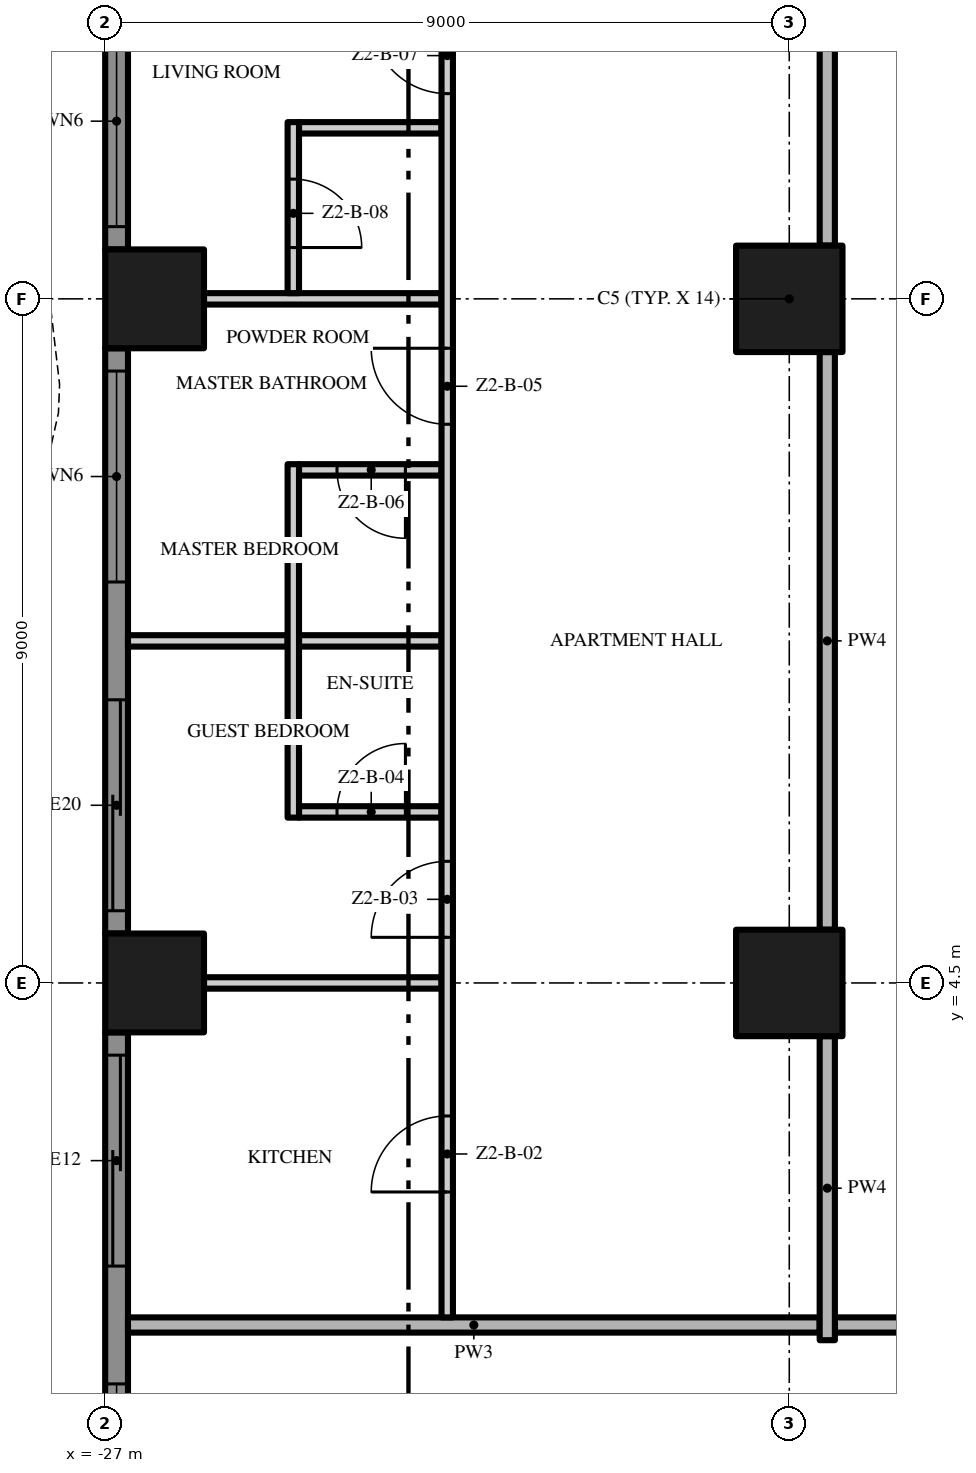
"""IFC4 building model, lengths in metres.
Left out: names, types, materials, properties, quantities, classifications, styles, units other than length and angle.
Written with IfcOpenShell. Run it as: python <this file> out.ifc"""

import sys

from ifc_helpers import new_model, si_unit, direction, frame, frame_2d, origin, origin_2d, place, context, subcontext, project, spatial, polyline, rectangle, outline, extrude, element, fill, save


model = new_model("IFC4")
c1 = context("Model", 3, precision=1e-05, world=origin(), true_north=direction((0.0, 1.0)))
c2 = subcontext(c1, "Body", "Model", "MODEL_VIEW")
j1 = project(units=[si_unit("LENGTHUNIT", "METRE"), si_unit("PLANEANGLEUNIT", "RADIAN")], contexts=[c1])
p1 = place(None, origin())
s1 = spatial("IfcSite", under=j1, at=p1, CompositionType="ELEMENT")
p2 = place(p1, origin())
s2 = spatial("IfcBuilding", under=s1, at=p2, CompositionType="ELEMENT")
p3 = place(p2, frame((0.0, 0.0, 88.4)))
s3 = spatial("IfcBuildingStorey", under=s2, at=p3, CompositionType="ELEMENT", Elevation=88.4)
for number, where, z_axis, x_axis in (
    (1, (-18.0, 13.5, 0.0), (0.0, 0.0, 1.0), (1.0, 0.0, 0.0)),
    (2, (-18.0, 4.5, 0.0), (0.0, 0.0, 1.0), (1.0, 0.0, 0.0)),
):
    element("IfcColumn", number, at=place(p3, frame(where, z_axis=z_axis, x_axis=x_axis)), inside=s3, PredefinedType="COLUMN", context=c2, shape_type="SweptSolid", body=[
        extrude(rectangle(XDim=1.4, YDim=1.4, at=origin_2d()), origin(), (0.0, 0.0, 1.0), 3.5),
    ])
for number, where, z_axis, x_axis in (
    (3, (-26.35, 13.5, 0.0), (0.0, 0.0, 1.0), (1.0, 0.0, 0.0)),
    (4, (-26.35, 4.5, 0.0), (0.0, 0.0, 1.0), (1.0, 0.0, 0.0)),
):
    element("IfcColumn", number, at=place(p3, frame(where, z_axis=z_axis, x_axis=x_axis)), inside=s3, PredefinedType="COLUMN", context=c2, shape_type="SweptSolid", body=[
        extrude(rectangle(XDim=1.3, YDim=1.3, at=origin_2d()), origin(), (0.0, 0.0, 1.0), 3.5),
    ])
p4 = place(p3, frame((-26.85, 14.15, 0.0), z_axis=(0.0, 0.0, 1.0), x_axis=(0.0, 1.0, 0.0)))
e5 = element("IfcWall", 5, at=p4, inside=s3, PredefinedType="SOLIDWALL", context=c2, shape_type="SweptSolid", body=[
    extrude(rectangle(XDim=3.55, YDim=0.3, at=frame_2d((1.775, 0.0))), origin(), (0.0, 0.0, 1.0), 3.5),
])
p5 = place(p4, frame((0.3, 0.0, 0.45)))
e6 = element("IfcOpeningElement", 6, at=p5, cuts=e5, PredefinedType="OPENING", context=c2, shape_type="SweptSolid", body=[
    extrude(rectangle(XDim=2.775, YDim=2.65, at=frame_2d((1.387, 1.325))), frame((0.0, 0.16, 0.0), z_axis=(0.0, -1.0, 0.0), x_axis=(1.0, 0.0, 0.0)), (0.0, 0.0, 1.0), 0.32),
])
p6 = place(p3, frame((-26.85, 5.15, 0.0), z_axis=(0.0, 0.0, 1.0), x_axis=(0.0, 1.0, 0.0)))
e7 = element("IfcWall", 7, at=p6, inside=s3, PredefinedType="SOLIDWALL", context=c2, shape_type="SweptSolid", body=[
    extrude(rectangle(XDim=7.7, YDim=0.3, at=frame_2d((3.85, 0.0))), origin(), (0.0, 0.0, 1.0), 3.5),
])
p7 = place(p6, frame((4.625, 0.0, 0.45)))
e8 = element("IfcOpeningElement", 8, at=p7, cuts=e7, PredefinedType="OPENING", context=c2, shape_type="SweptSolid", body=[
    extrude(rectangle(XDim=2.775, YDim=2.65, at=frame_2d((1.387, 1.325))), frame((0.0, 0.16, 0.0), z_axis=(0.0, -1.0, 0.0), x_axis=(1.0, 0.0, 0.0)), (0.0, 0.0, 1.0), 0.32),
])
p8 = place(p6, frame((0.3, 0.0, 0.0)))
e9 = element("IfcOpeningElement", 9, at=p8, cuts=e7, PredefinedType="OPENING", context=c2, shape_type="SweptSolid", body=[
    extrude(rectangle(XDim=2.775, YDim=2.4, at=frame_2d((1.387, 1.2))), frame((0.0, 0.16, 0.0), z_axis=(0.0, -1.0, 0.0), x_axis=(1.0, 0.0, 0.0)), (0.0, 0.0, 1.0), 0.32),
])
p9 = place(p3, frame((-26.85, -3.85, 0.0), z_axis=(0.0, 0.0, 1.0), x_axis=(0.0, 1.0, 0.0)))
e10 = element("IfcWall", 10, at=p9, inside=s3, PredefinedType="SOLIDWALL", context=c2, shape_type="SweptSolid", body=[
    extrude(rectangle(XDim=7.7, YDim=0.3, at=frame_2d((3.85, 0.0))), origin(), (0.0, 0.0, 1.0), 3.5),
])
p10 = place(p9, frame((4.625, 0.0, 0.0)))
e11 = element("IfcOpeningElement", 11, at=p10, cuts=e10, PredefinedType="OPENING", context=c2, shape_type="SweptSolid", body=[
    extrude(rectangle(XDim=2.775, YDim=2.4, at=frame_2d((1.387, 1.2))), frame((0.0, 0.16, 0.0), z_axis=(0.0, -1.0, 0.0), x_axis=(1.0, 0.0, 0.0)), (0.0, 0.0, 1.0), 0.32),
])
p11 = place(p9, frame((0.3, 0.0, 0.45)))
e12 = element("IfcOpeningElement", 12, at=p11, cuts=e10, PredefinedType="OPENING", context=c2, shape_type="SweptSolid", body=[
    extrude(rectangle(XDim=2.775, YDim=2.65, at=frame_2d((1.387, 1.325))), frame((0.0, 0.16, 0.0), z_axis=(0.0, -1.0, 0.0), x_axis=(1.0, 0.0, 0.0)), (0.0, 0.0, 1.0), 0.32),
])
p12 = place(p3, origin())
e13 = element("IfcWall", 13, at=p12, inside=s3, PredefinedType="USERDEFINED", context=c2, shape_type="SweptSolid", body=[
    extrude(outline(polyline([(-29.649, 18.0), (-28.988, 16.5), (-28.255, 15.0), (-27.731, 13.5), (-27.6, 12.375), (-27.615, 12.0), (-27.951, 10.5), (-28.612, 9.0), (-29.345, 7.5), (-29.869, 6.0), (-30.0, 4.875), (-29.985, 4.5), (-29.649, 3.0), (-28.988, 1.5), (-28.255, 0.0), (-27.731, -1.5), (-27.6, -2.625), (-27.615, -3.0), (-27.951, -4.5), (-28.612, -6.0), (-29.345, -7.5), (-29.869, -9.0), (-30.0, -10.125), (-29.985, -10.5), (-29.649, -12.0), (-28.988, -13.5), (-28.255, -15.0), (-27.731, -16.5), (-27.6, -17.625), (-27.615, -18.0), (-27.365, -18.01), (-27.349, -17.615), (-27.486, -16.444), (-28.024, -14.904), (-28.761, -13.395), (-29.41, -11.921), (-29.736, -10.467), (-29.749, -10.135), (-29.624, -9.056), (-29.114, -7.596), (-28.385, -6.105), (-27.713, -4.579), (-27.366, -3.033), (-27.349, -2.615), (-27.486, -1.444), (-28.024, 0.096), (-28.761, 1.605), (-29.41, 3.079), (-29.736, 4.533), (-29.749, 4.865), (-29.624, 5.944), (-29.114, 7.404), (-28.385, 8.895), (-27.713, 10.421), (-27.366, 11.967), (-27.349, 12.385), (-27.486, 13.556), (-28.024, 15.096), (-28.761, 16.605), (-29.42, 18.101), (-29.649, 18.0)])), origin(), (0.0, 0.0, 1.0), 0.9),
])
p13 = place(p3, frame((-0.1, 0.0, 0.0), z_axis=(0.0, 0.0, 1.0), x_axis=(-1.0, 0.0, 0.0)))
e14 = element("IfcWall", 14, at=p13, inside=s3, PredefinedType="PARTITIONING", context=c2, shape_type="SweptSolid", body=[
    extrude(rectangle(XDim=17.3, YDim=0.2, at=frame_2d((8.65, 0.0))), origin(), (0.0, 0.0, 1.0), 3.5),
])
p14 = place(p13, frame((8.15, 0.0, 0.0)))
e15 = element("IfcOpeningElement", 15, at=p14, cuts=e14, PredefinedType="OPENING", context=c2, shape_type="SweptSolid", body=[
    extrude(rectangle(XDim=1.5, YDim=2.4, at=frame_2d((0.75, 1.2))), frame((0.0, 0.11, 0.0), z_axis=(0.0, -1.0, 0.0), x_axis=(1.0, 0.0, 0.0)), (0.0, 0.0, 1.0), 0.22),
])
p15 = place(p3, frame((-26.7, 0.0, 0.0), z_axis=(0.0, 0.0, 1.0), x_axis=(1.0, 0.0, 0.0)))
e16 = element("IfcWall", 16, at=p15, inside=s3, PredefinedType="PARTITIONING", context=c2, shape_type="SweptSolid", body=[
    extrude(rectangle(XDim=9.1, YDim=0.2, at=frame_2d((4.55, 0.0))), origin(), (0.0, 0.0, 1.0), 3.5),
])
p16 = place(p3, frame((-25.7, 4.5, 0.0), z_axis=(0.0, 0.0, 1.0), x_axis=(1.0, 0.0, 0.0)))
e17 = element("IfcWall", 17, at=p16, inside=s3, PredefinedType="PARTITIONING", context=c2, shape_type="SweptSolid", body=[
    extrude(rectangle(XDim=3.125, YDim=0.15, at=frame_2d((1.562, 0.0))), origin(), (0.0, 0.0, 1.0), 3.5),
])
p17 = place(p3, frame((-24.45, 6.75, 0.0), z_axis=(0.0, 0.0, 1.0), x_axis=(1.0, 0.0, 0.0)))
e18 = element("IfcWall", 18, at=p17, inside=s3, PredefinedType="PARTITIONING", context=c2, shape_type="SweptSolid", body=[
    extrude(rectangle(XDim=1.875, YDim=0.15, at=frame_2d((0.938, 0.0))), origin(), (0.0, 0.0, 1.0), 3.5),
])
p18 = place(p17, frame((0.5, 0.0, 0.0)))
e19 = element("IfcOpeningElement", 19, at=p18, cuts=e18, PredefinedType="OPENING", context=c2, shape_type="SweptSolid", body=[
    extrude(rectangle(XDim=0.9, YDim=2.1, at=frame_2d((0.45, 1.05))), frame((0.0, 0.085, 0.0), z_axis=(0.0, -1.0, 0.0), x_axis=(1.0, 0.0, 0.0)), (0.0, 0.0, 1.0), 0.17),
])
p19 = place(p3, frame((-26.7, 9.0, 0.0), z_axis=(0.0, 0.0, 1.0), x_axis=(1.0, 0.0, 0.0)))
e20 = element("IfcWall", 20, at=p19, inside=s3, PredefinedType="PARTITIONING", context=c2, shape_type="SweptSolid", body=[
    extrude(rectangle(XDim=2.1, YDim=0.15, at=frame_2d((1.05, 0.0))), origin(), (0.0, 0.0, 1.0), 3.5),
])
p20 = place(p3, frame((-24.45, 9.0, 0.0), z_axis=(0.0, 0.0, 1.0), x_axis=(1.0, 0.0, 0.0)))
e21 = element("IfcWall", 21, at=p20, inside=s3, PredefinedType="PARTITIONING", context=c2, shape_type="SweptSolid", body=[
    extrude(rectangle(XDim=1.875, YDim=0.15, at=frame_2d((0.938, 0.0))), origin(), (0.0, 0.0, 1.0), 3.5),
])
p21 = place(p3, frame((-22.575, 11.25, 0.0), z_axis=(0.0, 0.0, 1.0), x_axis=(-1.0, 0.0, 0.0)))
e22 = element("IfcWall", 22, at=p21, inside=s3, PredefinedType="PARTITIONING", context=c2, shape_type="SweptSolid", body=[
    extrude(rectangle(XDim=1.875, YDim=0.15, at=frame_2d((0.938, 0.0))), origin(), (0.0, 0.0, 1.0), 3.5),
])
p22 = place(p21, frame((0.475, 0.0, 0.0)))
e23 = element("IfcOpeningElement", 23, at=p22, cuts=e22, PredefinedType="OPENING", context=c2, shape_type="SweptSolid", body=[
    extrude(rectangle(XDim=0.9, YDim=2.1, at=frame_2d((0.45, 1.05))), frame((0.0, 0.085, 0.0), z_axis=(0.0, -1.0, 0.0), x_axis=(1.0, 0.0, 0.0)), (0.0, 0.0, 1.0), 0.17),
])
p23 = place(p3, frame((-25.7, 13.5, 0.0), z_axis=(0.0, 0.0, 1.0), x_axis=(1.0, 0.0, 0.0)))
e24 = element("IfcWall", 24, at=p23, inside=s3, PredefinedType="PARTITIONING", context=c2, shape_type="SweptSolid", body=[
    extrude(rectangle(XDim=3.125, YDim=0.15, at=frame_2d((1.562, 0.0))), origin(), (0.0, 0.0, 1.0), 3.5),
])
p24 = place(p3, frame((-24.45, 15.75, 0.0), z_axis=(0.0, 0.0, 1.0), x_axis=(1.0, 0.0, 0.0)))
e25 = element("IfcWall", 25, at=p24, inside=s3, PredefinedType="PARTITIONING", context=c2, shape_type="SweptSolid", body=[
    extrude(rectangle(XDim=1.875, YDim=0.15, at=frame_2d((0.938, 0.0))), origin(), (0.0, 0.0, 1.0), 3.5),
])
p25 = place(p3, frame((-24.525, 6.675, 0.0), z_axis=(0.0, 0.0, 1.0), x_axis=(0.0, 1.0, 0.0)))
e26 = element("IfcWall", 26, at=p25, inside=s3, PredefinedType="PARTITIONING", context=c2, shape_type="SweptSolid", body=[
    extrude(rectangle(XDim=4.65, YDim=0.15, at=frame_2d((2.325, 0.0))), origin(), (0.0, 0.0, 1.0), 3.5),
])
p26 = place(p3, frame((-24.525, 15.825, 0.0), z_axis=(0.0, 0.0, 1.0), x_axis=(0.0, -1.0, 0.0)))
e27 = element("IfcWall", 27, at=p26, inside=s3, PredefinedType="PARTITIONING", context=c2, shape_type="SweptSolid", body=[
    extrude(rectangle(XDim=2.25, YDim=0.15, at=frame_2d((1.125, 0.0))), origin(), (0.0, 0.0, 1.0), 3.5),
])
p27 = place(p26, frame((0.75, 0.0, 0.0)))
e28 = element("IfcOpeningElement", 28, at=p27, cuts=e27, PredefinedType="OPENING", context=c2, shape_type="SweptSolid", body=[
    extrude(rectangle(XDim=0.9, YDim=2.1, at=frame_2d((0.45, 1.05))), frame((0.0, 0.085, 0.0), z_axis=(0.0, -1.0, 0.0), x_axis=(1.0, 0.0, 0.0)), (0.0, 0.0, 1.0), 0.17),
])
p28 = place(p3, frame((-22.5, 0.1, 0.0), z_axis=(0.0, 0.0, 1.0), x_axis=(0.0, 1.0, 0.0)))
e29 = element("IfcWall", 29, at=p28, inside=s3, PredefinedType="PARTITIONING", context=c2, shape_type="SweptSolid", body=[
    extrude(rectangle(XDim=17.25, YDim=0.15, at=frame_2d((8.625, 0.0))), origin(), (0.0, 0.0, 1.0), 3.5),
])
p29 = place(p28, frame((1.65, 0.0, 0.0)))
e30 = element("IfcOpeningElement", 30, at=p29, cuts=e29, PredefinedType="OPENING", context=c2, shape_type="SweptSolid", body=[
    extrude(rectangle(XDim=1.0, YDim=2.4, at=frame_2d((0.5, 1.2))), frame((0.0, 0.085, 0.0), z_axis=(0.0, -1.0, 0.0), x_axis=(1.0, 0.0, 0.0)), (0.0, 0.0, 1.0), 0.17),
])
p30 = place(p28, frame((5.0, 0.0, 0.0)))
e31 = element("IfcOpeningElement", 31, at=p30, cuts=e29, PredefinedType="OPENING", context=c2, shape_type="SweptSolid", body=[
    extrude(rectangle(XDim=1.0, YDim=2.4, at=frame_2d((0.5, 1.2))), frame((0.0, 0.085, 0.0), z_axis=(0.0, -1.0, 0.0), x_axis=(1.0, 0.0, 0.0)), (0.0, 0.0, 1.0), 0.17),
])
p31 = place(p28, frame((11.75, 0.0, 0.0)))
e32 = element("IfcOpeningElement", 32, at=p31, cuts=e29, PredefinedType="OPENING", context=c2, shape_type="SweptSolid", body=[
    extrude(rectangle(XDim=1.0, YDim=2.4, at=frame_2d((0.5, 1.2))), frame((0.0, 0.085, 0.0), z_axis=(0.0, -1.0, 0.0), x_axis=(1.0, 0.0, 0.0)), (0.0, 0.0, 1.0), 0.17),
])
p32 = place(p28, frame((16.1, 0.0, 0.0)))
e33 = element("IfcOpeningElement", 33, at=p32, cuts=e29, PredefinedType="OPENING", context=c2, shape_type="SweptSolid", body=[
    extrude(rectangle(XDim=1.0, YDim=2.4, at=frame_2d((0.5, 1.2))), frame((0.0, 0.085, 0.0), z_axis=(0.0, -1.0, 0.0), x_axis=(1.0, 0.0, 0.0)), (0.0, 0.0, 1.0), 0.17),
])
p33 = place(p3, frame((-17.5, -0.2, 0.0), z_axis=(0.0, 0.0, 1.0), x_axis=(0.0, 1.0, 0.0)))
e34 = element("IfcWall", 34, at=p33, inside=s3, PredefinedType="PARTITIONING", context=c2, shape_type="SweptSolid", body=[
    extrude(rectangle(XDim=4.0, YDim=0.2, at=frame_2d((2.0, 0.0))), origin(), (0.0, 0.0, 1.0), 3.5),
])
p34 = place(p3, frame((-17.5, 5.2, 0.0), z_axis=(0.0, 0.0, 1.0), x_axis=(0.0, 1.0, 0.0)))
e35 = element("IfcWall", 35, at=p34, inside=s3, PredefinedType="PARTITIONING", context=c2, shape_type="SweptSolid", body=[
    extrude(rectangle(XDim=7.6, YDim=0.2, at=frame_2d((3.8, 0.0))), origin(), (0.0, 0.0, 1.0), 3.5),
])
p35 = place(p3, frame((-17.5, 14.2, 0.0), z_axis=(0.0, 0.0, 1.0), x_axis=(0.0, 1.0, 0.0)))
e36 = element("IfcWall", 36, at=p35, inside=s3, PredefinedType="PARTITIONING", context=c2, shape_type="SweptSolid", body=[
    extrude(rectangle(XDim=7.0, YDim=0.2, at=frame_2d((3.5, 0.0))), origin(), (0.0, 0.0, 1.0), 3.5),
])
p36 = place(p35, frame((3.2, 0.0, 0.0)))
e37 = element("IfcOpeningElement", 37, at=p36, cuts=e36, PredefinedType="OPENING", context=c2, shape_type="SweptSolid", body=[
    extrude(rectangle(XDim=1.2, YDim=2.4, at=frame_2d((0.6, 1.2))), frame((0.0, 0.11, 0.0), z_axis=(0.0, -1.0, 0.0), x_axis=(1.0, 0.0, 0.0)), (0.0, 0.0, 1.0), 0.22),
])
p37 = place(p5, origin())
e38 = element("IfcWindow", 38, at=p37, inside=s3, PartitioningType="SINGLE_PANEL", PredefinedType="WINDOW", context=c2, shape_type="SweptSolid", body=[
    extrude(rectangle(XDim=2.775, YDim=2.65, at=frame_2d((1.387, 1.325))), frame((0.0, 0.03, 0.0), z_axis=(0.0, -1.0, 0.0), x_axis=(1.0, 0.0, 0.0)), (0.0, 0.0, 1.0), 0.06),
])
fill(e6, e38)
p38 = place(p7, origin())
e39 = element("IfcWindow", 39, at=p38, inside=s3, PartitioningType="SINGLE_PANEL", PredefinedType="WINDOW", context=c2, shape_type="SweptSolid", body=[
    extrude(rectangle(XDim=2.775, YDim=2.65, at=frame_2d((1.387, 1.325))), frame((0.0, 0.03, 0.0), z_axis=(0.0, -1.0, 0.0), x_axis=(1.0, 0.0, 0.0)), (0.0, 0.0, 1.0), 0.06),
])
fill(e8, e39)
p39 = place(p8, origin())
e40 = element("IfcDoor", 40, at=p39, inside=s3, OperationType="SINGLE_SWING_LEFT", PredefinedType="DOOR", context=c2, shape_type="SweptSolid", body=[
    extrude(rectangle(XDim=2.775, YDim=2.4, at=frame_2d((1.387, 1.2))), frame((0.0, 0.025, 0.0), z_axis=(0.0, -1.0, 0.0), x_axis=(1.0, 0.0, 0.0)), (0.0, 0.0, 1.0), 0.05),
])
fill(e9, e40)
p40 = place(p10, origin())
e41 = element("IfcDoor", 41, at=p40, inside=s3, OperationType="SINGLE_SWING_LEFT", PredefinedType="DOOR", context=c2, shape_type="SweptSolid", body=[
    extrude(rectangle(XDim=2.775, YDim=2.4, at=frame_2d((1.387, 1.2))), frame((0.0, 0.025, 0.0), z_axis=(0.0, -1.0, 0.0), x_axis=(1.0, 0.0, 0.0)), (0.0, 0.0, 1.0), 0.05),
])
fill(e11, e41)
p41 = place(p11, origin())
e42 = element("IfcWindow", 42, at=p41, inside=s3, PartitioningType="SINGLE_PANEL", PredefinedType="WINDOW", context=c2, shape_type="SweptSolid", body=[
    extrude(rectangle(XDim=2.775, YDim=2.65, at=frame_2d((1.387, 1.325))), frame((0.0, 0.03, 0.0), z_axis=(0.0, -1.0, 0.0), x_axis=(1.0, 0.0, 0.0)), (0.0, 0.0, 1.0), 0.06),
])
fill(e12, e42)
p42 = place(p29, origin())
e43 = element("IfcDoor", 43, at=p42, inside=s3, OperationType="SINGLE_SWING_LEFT", PredefinedType="DOOR", context=c2, shape_type="SweptSolid", body=[
    extrude(rectangle(XDim=1.0, YDim=2.4, at=frame_2d((0.5, 1.2))), frame((0.0, 0.025, 0.0), z_axis=(0.0, -1.0, 0.0), x_axis=(1.0, 0.0, 0.0)), (0.0, 0.0, 1.0), 0.05),
])
fill(e30, e43)
p43 = place(p30, origin())
e44 = element("IfcDoor", 44, at=p43, inside=s3, OperationType="SINGLE_SWING_LEFT", PredefinedType="DOOR", context=c2, shape_type="SweptSolid", body=[
    extrude(rectangle(XDim=1.0, YDim=2.4, at=frame_2d((0.5, 1.2))), frame((0.0, 0.025, 0.0), z_axis=(0.0, -1.0, 0.0), x_axis=(1.0, 0.0, 0.0)), (0.0, 0.0, 1.0), 0.05),
])
fill(e31, e44)
p44 = place(p18, origin())
e45 = element("IfcDoor", 45, at=p44, inside=s3, OperationType="SINGLE_SWING_RIGHT", PredefinedType="DOOR", context=c2, shape_type="SweptSolid", body=[
    extrude(rectangle(XDim=0.9, YDim=2.1, at=frame_2d((0.45, 1.05))), frame((0.0, 0.025, 0.0), z_axis=(0.0, -1.0, 0.0), x_axis=(1.0, 0.0, 0.0)), (0.0, 0.0, 1.0), 0.05),
])
fill(e19, e45)
p45 = place(p31, origin())
e46 = element("IfcDoor", 46, at=p45, inside=s3, OperationType="SINGLE_SWING_RIGHT", PredefinedType="DOOR", context=c2, shape_type="SweptSolid", body=[
    extrude(rectangle(XDim=1.0, YDim=2.4, at=frame_2d((0.5, 1.2))), frame((0.0, 0.025, 0.0), z_axis=(0.0, -1.0, 0.0), x_axis=(1.0, 0.0, 0.0)), (0.0, 0.0, 1.0), 0.05),
])
fill(e32, e46)
p46 = place(p22, origin())
e47 = element("IfcDoor", 47, at=p46, inside=s3, OperationType="SINGLE_SWING_LEFT", PredefinedType="DOOR", context=c2, shape_type="SweptSolid", body=[
    extrude(rectangle(XDim=0.9, YDim=2.1, at=frame_2d((0.45, 1.05))), frame((0.0, 0.025, 0.0), z_axis=(0.0, -1.0, 0.0), x_axis=(1.0, 0.0, 0.0)), (0.0, 0.0, 1.0), 0.05),
])
fill(e23, e47)
p47 = place(p32, origin())
e48 = element("IfcDoor", 48, at=p47, inside=s3, OperationType="SINGLE_SWING_RIGHT", PredefinedType="DOOR", context=c2, shape_type="SweptSolid", body=[
    extrude(rectangle(XDim=1.0, YDim=2.4, at=frame_2d((0.5, 1.2))), frame((0.0, 0.025, 0.0), z_axis=(0.0, -1.0, 0.0), x_axis=(1.0, 0.0, 0.0)), (0.0, 0.0, 1.0), 0.05),
])
fill(e33, e48)
p48 = place(p27, origin())
e49 = element("IfcDoor", 49, at=p48, inside=s3, OperationType="SINGLE_SWING_RIGHT", PredefinedType="DOOR", context=c2, shape_type="SweptSolid", body=[
    extrude(rectangle(XDim=0.9, YDim=2.1, at=frame_2d((0.45, 1.05))), frame((0.0, 0.025, 0.0), z_axis=(0.0, -1.0, 0.0), x_axis=(1.0, 0.0, 0.0)), (0.0, 0.0, 1.0), 0.05),
])
fill(e28, e49)
save(model, sys.argv[1])
